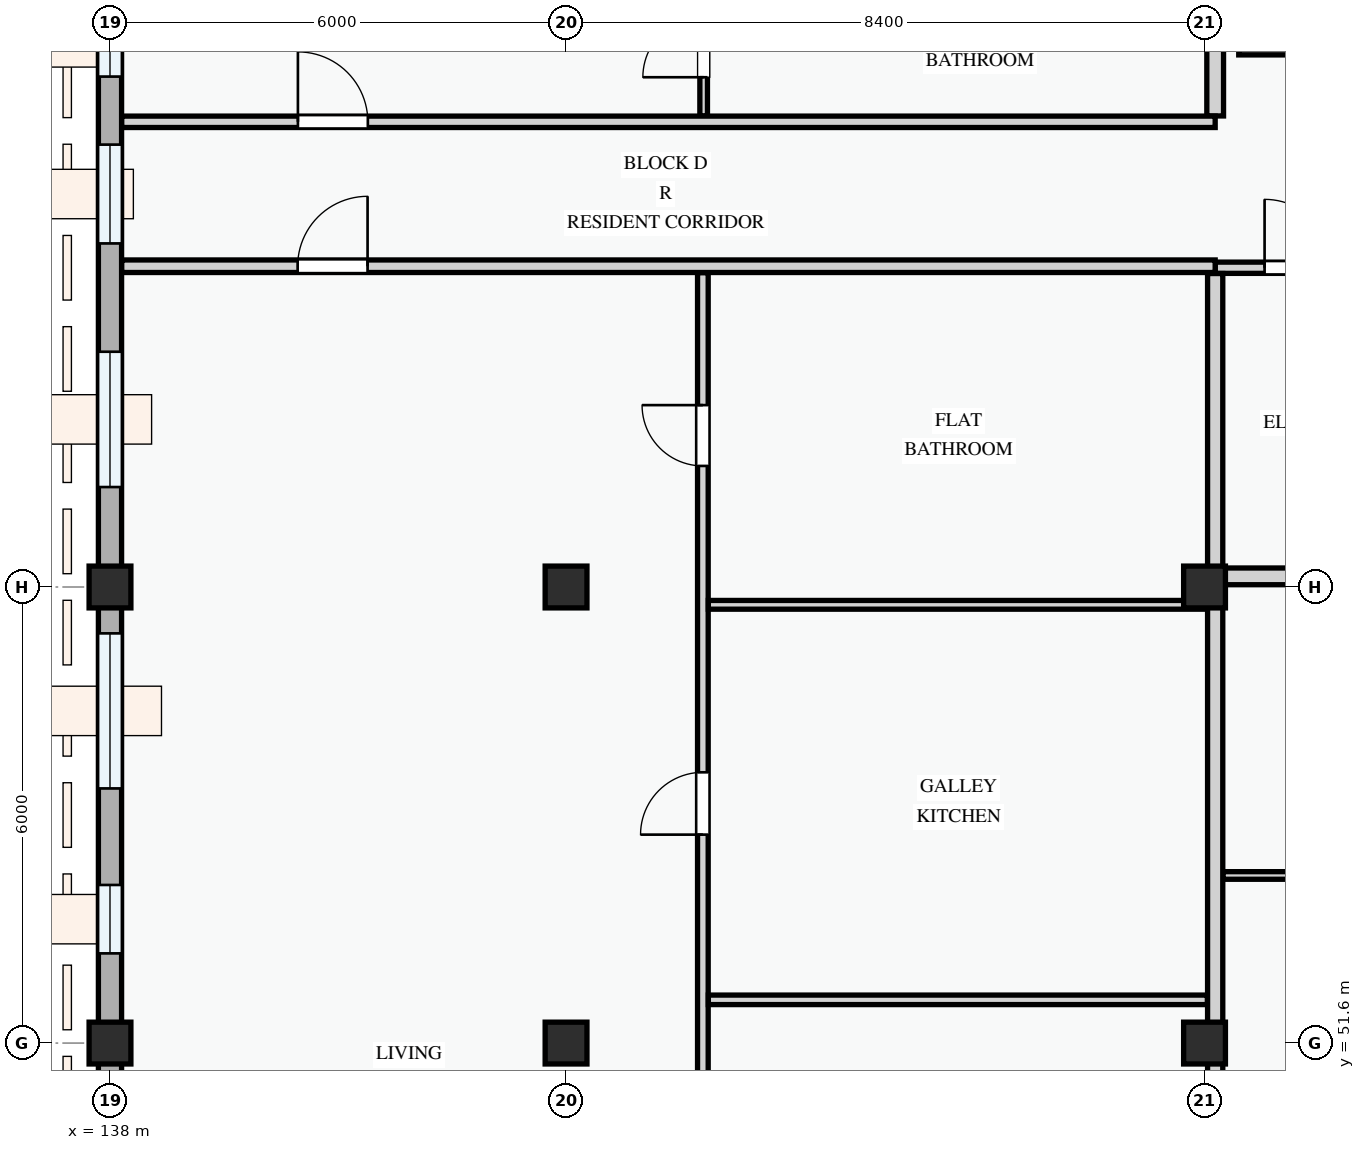
"""IFC4 building model, lengths in metres.
Left out: names, types, materials, properties, quantities, classifications, styles, units other than length and angle.
Written with IfcOpenShell. Run it as: python <this file> out.ifc"""

import sys

from ifc_helpers import new_model, si_unit, direction, frame, frame_2d, origin, origin_2d, place, context, subcontext, project, spatial, rectangle, extrude, element, fill, save


model = new_model("IFC4")
c1 = context("Model", 3, precision=1e-05, world=origin(), true_north=direction((0.0, 1.0)))
c2 = subcontext(c1, "Body", "Model", "MODEL_VIEW")
j1 = project(units=[si_unit("LENGTHUNIT", "METRE"), si_unit("PLANEANGLEUNIT", "RADIAN")], contexts=[c1])
p1 = place(None, origin())
s1 = spatial("IfcSite", under=j1, at=p1, CompositionType="ELEMENT")
p2 = place(p1, origin())
s2 = spatial("IfcBuilding", under=s1, at=p2, CompositionType="ELEMENT")
p3 = place(p2, frame((0.0, 0.0, 14.7)))
s3 = spatial("IfcBuildingStorey", under=s2, at=p3, CompositionType="ELEMENT", Elevation=14.7)
for number, where, z_axis, x_axis in (
    (1, (138.0, 51.6, 0.0), (0.0, 0.0, 1.0), (1.0, 0.0, 0.0)),
    (2, (138.0, 57.6, 0.0), (0.0, 0.0, 1.0), (1.0, 0.0, 0.0)),
    (3, (144.0, 51.6, 0.0), (0.0, 0.0, 1.0), (1.0, 0.0, 0.0)),
    (4, (144.0, 57.6, 0.0), (0.0, 0.0, 1.0), (1.0, 0.0, 0.0)),
    (5, (152.4, 51.6, 0.0), (0.0, 0.0, 1.0), (1.0, 0.0, 0.0)),
    (6, (152.4, 57.6, 0.0), (0.0, 0.0, 1.0), (1.0, 0.0, 0.0)),
):
    element("IfcColumn", number, at=place(p3, frame(where, z_axis=z_axis, x_axis=x_axis)), inside=s3, PredefinedType="COLUMN", context=c2, shape_type="SweptSolid", body=[
        extrude(rectangle(XDim=0.55, YDim=0.55, at=origin_2d()), origin(), (0.0, 0.0, 1.0), 3.3),
    ])
p4 = place(p3, frame((138.0, 66.0, 0.0), z_axis=(0.0, 0.0, 1.0), x_axis=(0.0, -1.0, 0.0)))
e7 = element("IfcWall", 7, at=p4, inside=s3, PredefinedType="STANDARD", context=c2, shape_type="SweptSolid", body=[
    extrude(rectangle(XDim=8.4, YDim=0.305, at=frame_2d((4.2, 0.0))), origin(), (0.0, 0.0, 1.0), 2.425),
])
p5 = place(p4, frame((0.785, 0.0, 0.78)))
e8 = element("IfcOpeningElement", 8, at=p5, cuts=e7, PredefinedType="OPENING", context=c2, shape_type="SweptSolid", body=[
    extrude(rectangle(XDim=0.9, YDim=1.2, at=frame_2d((0.45, 0.6))), frame((0.0, 0.163, 0.0), z_axis=(0.0, -1.0, 0.0), x_axis=(1.0, 0.0, 0.0)), (0.0, 0.0, 1.0), 0.325),
])
p6 = place(p4, frame((2.58, 0.0, 0.78)))
e9 = element("IfcOpeningElement", 9, at=p6, cuts=e7, PredefinedType="OPENING", context=c2, shape_type="SweptSolid", body=[
    extrude(rectangle(XDim=1.3, YDim=1.4, at=frame_2d((0.65, 0.7))), frame((0.0, 0.163, 0.0), z_axis=(0.0, -1.0, 0.0), x_axis=(1.0, 0.0, 0.0)), (0.0, 0.0, 1.0), 0.325),
])
p7 = place(p4, frame((5.305, 0.0, 0.78)))
e10 = element("IfcOpeningElement", 10, at=p7, cuts=e7, PredefinedType="OPENING", context=c2, shape_type="SweptSolid", body=[
    extrude(rectangle(XDim=1.78, YDim=1.42, at=frame_2d((0.89, 0.71))), frame((0.0, 0.163, 0.0), z_axis=(0.0, -1.0, 0.0), x_axis=(1.0, 0.0, 0.0)), (0.0, 0.0, 1.0), 0.325),
])
p8 = place(p3, frame((138.0, 57.6, 0.0), z_axis=(0.0, 0.0, 1.0), x_axis=(0.0, -1.0, 0.0)))
e11 = element("IfcWall", 11, at=p8, inside=s3, PredefinedType="STANDARD", context=c2, shape_type="SweptSolid", body=[
    extrude(rectangle(XDim=6.0, YDim=0.305, at=frame_2d((3.0, 0.0))), origin(), (0.0, 0.0, 1.0), 2.575),
])
p9 = place(p8, frame((0.61, 0.0, 0.78)))
e12 = element("IfcOpeningElement", 12, at=p9, cuts=e11, PredefinedType="OPENING", context=c2, shape_type="SweptSolid", body=[
    extrude(rectangle(XDim=2.04, YDim=1.46, at=frame_2d((1.02, 0.73))), frame((0.0, 0.163, 0.0), z_axis=(0.0, -1.0, 0.0), x_axis=(1.0, 0.0, 0.0)), (0.0, 0.0, 1.0), 0.325),
])
p10 = place(p8, frame((3.92, 0.0, 0.78)))
e13 = element("IfcOpeningElement", 13, at=p10, cuts=e11, PredefinedType="OPENING", context=c2, shape_type="SweptSolid", body=[
    extrude(rectangle(XDim=0.9, YDim=1.2, at=frame_2d((0.45, 0.6))), frame((0.0, 0.163, 0.0), z_axis=(0.0, -1.0, 0.0), x_axis=(1.0, 0.0, 0.0)), (0.0, 0.0, 1.0), 0.325),
])
p11 = place(p3, frame((138.0, 51.6, 0.0), z_axis=(0.0, 0.0, 1.0), x_axis=(0.0, -1.0, 0.0)))
e14 = element("IfcWall", 14, at=p11, inside=s3, PredefinedType="STANDARD", context=c2, shape_type="SweptSolid", body=[
    extrude(rectangle(XDim=8.4, YDim=0.305, at=frame_2d((4.2, 0.0))), origin(), (0.0, 0.0, 1.0), 2.425),
])
p12 = place(p11, frame((1.54, 0.0, 0.78)))
e15 = element("IfcOpeningElement", 15, at=p12, cuts=e14, PredefinedType="OPENING", context=c2, shape_type="SweptSolid", body=[
    extrude(rectangle(XDim=1.38, YDim=1.48, at=frame_2d((0.69, 0.74))), frame((0.0, 0.163, 0.0), z_axis=(0.0, -1.0, 0.0), x_axis=(1.0, 0.0, 0.0)), (0.0, 0.0, 1.0), 0.325),
])
p13 = place(p11, frame((5.31, 0.0, 0.78)))
e16 = element("IfcOpeningElement", 16, at=p13, cuts=e14, PredefinedType="OPENING", context=c2, shape_type="SweptSolid", body=[
    extrude(rectangle(XDim=1.72, YDim=1.52, at=frame_2d((0.86, 0.76))), frame((0.0, 0.163, 0.0), z_axis=(0.0, -1.0, 0.0), x_axis=(1.0, 0.0, 0.0)), (0.0, 0.0, 1.0), 0.325),
])
p14 = place(p3, frame((152.85, 64.725, 0.0), z_axis=(0.0, 0.0, 1.0), x_axis=(1.0, 0.0, 0.0)))
e17 = element("IfcWall", 17, at=p14, inside=s3, PredefinedType="SHEAR", context=c2, shape_type="SweptSolid", body=[
    extrude(rectangle(XDim=13.5, YDim=0.25, at=frame_2d((6.75, 0.0))), origin(), (0.0, 0.0, 1.0), 3.0),
])
p15 = place(p14, frame((6.2, 0.0, 0.0)))
e18 = element("IfcOpeningElement", 18, at=p15, cuts=e17, PredefinedType="OPENING", context=c2, shape_type="SweptSolid", body=[
    extrude(rectangle(XDim=1.1, YDim=2.15, at=frame_2d((0.55, 1.075))), frame((0.0, 0.135, 0.0), z_axis=(0.0, -1.0, 0.0), x_axis=(1.0, 0.0, 0.0)), (0.0, 0.0, 1.0), 0.27),
])
p16 = place(p3, frame((152.54, 61.8, 0.0), z_axis=(0.0, 0.0, 1.0), x_axis=(1.0, 0.0, 0.0)))
e19 = element("IfcWall", 19, at=p16, inside=s3, PredefinedType="PARTITIONING", context=c2, shape_type="SweptSolid", body=[
    extrude(rectangle(XDim=7.435, YDim=0.148, at=frame_2d((3.718, 0.0))), origin(), (0.0, 0.0, 1.0), 3.0),
])
p17 = place(p16, frame((0.65, 0.0, 0.0)))
e20 = element("IfcOpeningElement", 20, at=p17, cuts=e19, PredefinedType="OPENING", context=c2, shape_type="SweptSolid", body=[
    extrude(rectangle(XDim=0.9, YDim=2.1, at=frame_2d((0.45, 1.05))), frame((0.0, 0.084, 0.0), z_axis=(0.0, -1.0, 0.0), x_axis=(1.0, 0.0, 0.0)), (0.0, 0.0, 1.0), 0.168),
])
p18 = place(p16, frame((4.2, 0.0, 0.0)))
e21 = element("IfcOpeningElement", 21, at=p18, cuts=e19, PredefinedType="OPENING", context=c2, shape_type="SweptSolid", body=[
    extrude(rectangle(XDim=0.95, YDim=2.1, at=frame_2d((0.475, 1.05))), frame((0.0, 0.084, 0.0), z_axis=(0.0, -1.0, 0.0), x_axis=(1.0, 0.0, 0.0)), (0.0, 0.0, 1.0), 0.168),
])
p19 = place(p3, frame((152.642, 53.805, 0.0), z_axis=(0.0, 0.0, 1.0), x_axis=(1.0, 0.0, 0.0)))
e22 = element("IfcWall", 22, at=p19, inside=s3, PredefinedType="PARTITIONING", context=c2, shape_type="SweptSolid", body=[
    extrude(rectangle(XDim=7.361, YDim=0.1, at=frame_2d((3.68, 0.0))), origin(), (0.0, 0.0, 1.0), 3.0),
])
p20 = place(p19, frame((1.222, 0.0, 0.0)))
e23 = element("IfcOpeningElement", 23, at=p20, cuts=e22, PredefinedType="OPENING", context=c2, shape_type="SweptSolid", body=[
    extrude(rectangle(XDim=0.82, YDim=2.08, at=frame_2d((0.41, 1.04))), frame((0.0, 0.06, 0.0), z_axis=(0.0, -1.0, 0.0), x_axis=(1.0, 0.0, 0.0)), (0.0, 0.0, 1.0), 0.12),
])
p21 = place(p19, frame((4.117, 0.0, 0.0)))
e24 = element("IfcOpeningElement", 24, at=p21, cuts=e22, PredefinedType="OPENING", context=c2, shape_type="SweptSolid", body=[
    extrude(rectangle(XDim=0.85, YDim=2.1, at=frame_2d((0.425, 1.05))), frame((0.0, 0.06, 0.0), z_axis=(0.0, -1.0, 0.0), x_axis=(1.0, 0.0, 0.0)), (0.0, 0.0, 1.0), 0.12),
])
p22 = place(p19, frame((6.124, 0.0, 0.0)))
e25 = element("IfcOpeningElement", 25, at=p22, cuts=e22, PredefinedType="OPENING", context=c2, shape_type="SweptSolid", body=[
    extrude(rectangle(XDim=0.8, YDim=2.1, at=frame_2d((0.4, 1.05))), frame((0.0, 0.06, 0.0), z_axis=(0.0, -1.0, 0.0), x_axis=(1.0, 0.0, 0.0)), (0.0, 0.0, 1.0), 0.12),
])
p23 = place(p3, frame((152.642, 57.74, 0.0), z_axis=(0.0, 0.0, 1.0), x_axis=(1.0, 0.0, 0.0)))
e26 = element("IfcWall", 26, at=p23, inside=s3, PredefinedType="PARTITIONING", context=c2, shape_type="SweptSolid", body=[
    extrude(rectangle(XDim=7.361, YDim=0.22, at=frame_2d((3.68, 0.0))), origin(), (0.0, 0.0, 1.0), 2.375),
])
p24 = place(p3, frame((145.8, 43.354, 0.0), z_axis=(0.0, 0.0, 1.0), x_axis=(0.0, 1.0, 0.0)))
e27 = element("IfcWall", 27, at=p24, inside=s3, PredefinedType="PARTITIONING", context=c2, shape_type="SweptSolid", body=[
    extrude(rectangle(XDim=18.381, YDim=0.14, at=frame_2d((9.19, 0.0))), origin(), (0.0, 0.0, 1.0), 3.0),
])
p25 = place(p24, frame((3.935, 0.0, 0.0)))
e28 = element("IfcOpeningElement", 28, at=p25, cuts=e27, PredefinedType="OPENING", context=c2, shape_type="SweptSolid", body=[
    extrude(rectangle(XDim=0.85, YDim=2.1, at=frame_2d((0.425, 1.05))), frame((0.0, 0.08, 0.0), z_axis=(0.0, -1.0, 0.0), x_axis=(1.0, 0.0, 0.0)), (0.0, 0.0, 1.0), 0.16),
])
p26 = place(p24, frame((10.988, 0.0, 0.0)))
e29 = element("IfcOpeningElement", 29, at=p26, cuts=e27, PredefinedType="OPENING", context=c2, shape_type="SweptSolid", body=[
    extrude(rectangle(XDim=0.82, YDim=2.08, at=frame_2d((0.41, 1.04))), frame((0.0, 0.08, 0.0), z_axis=(0.0, -1.0, 0.0), x_axis=(1.0, 0.0, 0.0)), (0.0, 0.0, 1.0), 0.16),
])
p27 = place(p24, frame((15.838, 0.0, 0.0)))
e30 = element("IfcOpeningElement", 30, at=p27, cuts=e27, PredefinedType="OPENING", context=c2, shape_type="SweptSolid", body=[
    extrude(rectangle(XDim=0.8, YDim=2.1, at=frame_2d((0.4, 1.05))), frame((0.0, 0.08, 0.0), z_axis=(0.0, -1.0, 0.0), x_axis=(1.0, 0.0, 0.0)), (0.0, 0.0, 1.0), 0.16),
])
p28 = place(p3, frame((145.872, 52.169, 0.0), z_axis=(0.0, 0.0, 1.0), x_axis=(1.0, 0.0, 0.0)))
e31 = element("IfcWall", 31, at=p28, inside=s3, PredefinedType="PARTITIONING", context=c2, shape_type="SweptSolid", body=[
    extrude(rectangle(XDim=6.566, YDim=0.125, at=frame_2d((3.283, 0.0))), origin(), (0.0, 0.0, 1.0), 3.0),
])
p29 = place(p3, frame((145.872, 57.365, 0.0), z_axis=(0.0, 0.0, 1.0), x_axis=(1.0, 0.0, 0.0)))
e32 = element("IfcWall", 32, at=p29, inside=s3, PredefinedType="PARTITIONING", context=c2, shape_type="SweptSolid", body=[
    extrude(rectangle(XDim=6.566, YDim=0.115, at=frame_2d((3.283, 0.0))), origin(), (0.0, 0.0, 1.0), 2.375),
])
p30 = place(p3, frame((145.81, 63.797, 0.0), z_axis=(0.0, 0.0, 1.0), x_axis=(0.0, 1.0, 0.0)))
e33 = element("IfcWall", 33, at=p30, inside=s3, PredefinedType="PARTITIONING", context=c2, shape_type="SweptSolid", body=[
    extrude(rectangle(XDim=8.048, YDim=0.1, at=frame_2d((4.024, 0.0))), origin(), (0.0, 0.0, 1.0), 3.0),
])
p31 = place(p30, frame((0.51, 0.0, 0.0)))
e34 = element("IfcOpeningElement", 34, at=p31, cuts=e33, PredefinedType="OPENING", context=c2, shape_type="SweptSolid", body=[
    extrude(rectangle(XDim=0.8, YDim=2.1, at=frame_2d((0.4, 1.05))), frame((0.0, 0.06, 0.0), z_axis=(0.0, -1.0, 0.0), x_axis=(1.0, 0.0, 0.0)), (0.0, 0.0, 1.0), 0.12),
])
p32 = place(p30, frame((2.622, 0.0, 0.0)))
e35 = element("IfcOpeningElement", 35, at=p32, cuts=e33, PredefinedType="OPENING", context=c2, shape_type="SweptSolid", body=[
    extrude(rectangle(XDim=0.85, YDim=2.1, at=frame_2d((0.425, 1.05))), frame((0.0, 0.06, 0.0), z_axis=(0.0, -1.0, 0.0), x_axis=(1.0, 0.0, 0.0)), (0.0, 0.0, 1.0), 0.12),
])
p33 = place(p30, frame((5.745, 0.0, 0.0)))
e36 = element("IfcOpeningElement", 36, at=p33, cuts=e33, PredefinedType="OPENING", context=c2, shape_type="SweptSolid", body=[
    extrude(rectangle(XDim=0.82, YDim=2.08, at=frame_2d((0.41, 1.04))), frame((0.0, 0.06, 0.0), z_axis=(0.0, -1.0, 0.0), x_axis=(1.0, 0.0, 0.0)), (0.0, 0.0, 1.0), 0.12),
])
p34 = place(p3, frame((152.54, 43.26, 0.0), z_axis=(0.0, 0.0, 1.0), x_axis=(0.0, 1.0, 0.0)))
e37 = element("IfcWall", 37, at=p34, inside=s3, PredefinedType="PARTITIONING", context=c2, shape_type="SweptSolid", body=[
    extrude(rectangle(XDim=18.464, YDim=0.2, at=frame_2d((9.232, 0.0))), origin(), (0.0, 0.0, 1.0), 2.425),
])
p35 = place(p3, frame((152.54, 63.797, 0.0), z_axis=(0.0, 0.0, 1.0), x_axis=(0.0, 1.0, 0.0)))
e38 = element("IfcWall", 38, at=p35, inside=s3, PredefinedType="PARTITIONING", context=c2, shape_type="SweptSolid", body=[
    extrude(rectangle(XDim=8.048, YDim=0.22, at=frame_2d((4.024, 0.0))), origin(), (0.0, 0.0, 1.0), 2.425),
])
p36 = place(p3, frame((138.155, 61.82, 0.0), z_axis=(0.0, 0.0, 1.0), x_axis=(1.0, 0.0, 0.0)))
e39 = element("IfcWall", 39, at=p36, inside=s3, PredefinedType="PARTITIONING", context=c2, shape_type="SweptSolid", body=[
    extrude(rectangle(XDim=14.385, YDim=0.165, at=frame_2d((7.193, 0.0))), origin(), (0.0, 0.0, 1.0), 3.0),
])
p37 = place(p36, frame((2.314, 0.0, 0.0)))
e40 = element("IfcOpeningElement", 40, at=p37, cuts=e39, PredefinedType="OPENING", context=c2, shape_type="SweptSolid", body=[
    extrude(rectangle(XDim=0.92, YDim=2.1, at=frame_2d((0.46, 1.05))), frame((0.0, 0.093, 0.0), z_axis=(0.0, -1.0, 0.0), x_axis=(1.0, 0.0, 0.0)), (0.0, 0.0, 1.0), 0.185),
])
p38 = place(p3, frame((138.155, 63.72, 0.0), z_axis=(0.0, 0.0, 1.0), x_axis=(1.0, 0.0, 0.0)))
e41 = element("IfcWall", 41, at=p38, inside=s3, PredefinedType="PARTITIONING", context=c2, shape_type="SweptSolid", body=[
    extrude(rectangle(XDim=14.385, YDim=0.15, at=frame_2d((7.193, 0.0))), origin(), (0.0, 0.0, 1.0), 3.0),
])
p39 = place(p38, frame((2.318, 0.0, 0.0)))
e42 = element("IfcOpeningElement", 42, at=p39, cuts=e41, PredefinedType="OPENING", context=c2, shape_type="SweptSolid", body=[
    extrude(rectangle(XDim=0.92, YDim=2.1, at=frame_2d((0.46, 1.05))), frame((0.0, 0.085, 0.0), z_axis=(0.0, -1.0, 0.0), x_axis=(1.0, 0.0, 0.0)), (0.0, 0.0, 1.0), 0.17),
])
p40 = place(p5, origin())
e43 = element("IfcWindow", 43, at=p40, inside=s3, PartitioningType="SINGLE_PANEL", PredefinedType="WINDOW", context=c2, shape_type="SweptSolid", body=[
    extrude(rectangle(XDim=0.9, YDim=1.2, at=frame_2d((0.45, 0.6))), frame((0.0, 0.03, 0.0), z_axis=(0.0, -1.0, 0.0), x_axis=(1.0, 0.0, 0.0)), (0.0, 0.0, 1.0), 0.06),
])
fill(e8, e43)
p41 = place(p6, origin())
e44 = element("IfcWindow", 44, at=p41, inside=s3, PartitioningType="SINGLE_PANEL", PredefinedType="WINDOW", context=c2, shape_type="SweptSolid", body=[
    extrude(rectangle(XDim=1.3, YDim=1.4, at=frame_2d((0.65, 0.7))), frame((0.0, 0.03, 0.0), z_axis=(0.0, -1.0, 0.0), x_axis=(1.0, 0.0, 0.0)), (0.0, 0.0, 1.0), 0.06),
])
fill(e9, e44)
p42 = place(p7, origin())
e45 = element("IfcWindow", 45, at=p42, inside=s3, PartitioningType="DOUBLE_PANEL_VERTICAL", PredefinedType="WINDOW", context=c2, shape_type="SweptSolid", body=[
    extrude(rectangle(XDim=1.78, YDim=1.42, at=frame_2d((0.89, 0.71))), frame((0.0, 0.03, 0.0), z_axis=(0.0, -1.0, 0.0), x_axis=(1.0, 0.0, 0.0)), (0.0, 0.0, 1.0), 0.06),
])
fill(e10, e45)
p43 = place(p9, origin())
e46 = element("IfcWindow", 46, at=p43, inside=s3, PartitioningType="DOUBLE_PANEL_VERTICAL", PredefinedType="WINDOW", context=c2, shape_type="SweptSolid", body=[
    extrude(rectangle(XDim=2.04, YDim=1.46, at=frame_2d((1.02, 0.73))), frame((0.0, 0.03, 0.0), z_axis=(0.0, -1.0, 0.0), x_axis=(1.0, 0.0, 0.0)), (0.0, 0.0, 1.0), 0.06),
])
fill(e12, e46)
p44 = place(p10, origin())
e47 = element("IfcWindow", 47, at=p44, inside=s3, PartitioningType="SINGLE_PANEL", PredefinedType="WINDOW", context=c2, shape_type="SweptSolid", body=[
    extrude(rectangle(XDim=0.9, YDim=1.2, at=frame_2d((0.45, 0.6))), frame((0.0, 0.03, 0.0), z_axis=(0.0, -1.0, 0.0), x_axis=(1.0, 0.0, 0.0)), (0.0, 0.0, 1.0), 0.06),
])
fill(e13, e47)
p45 = place(p17, origin())
e48 = element("IfcDoor", 48, at=p45, inside=s3, OperationType="SINGLE_SWING_LEFT", PredefinedType="DOOR", context=c2, shape_type="SweptSolid", body=[
    extrude(rectangle(XDim=0.9, YDim=2.1, at=frame_2d((0.45, 1.05))), frame((0.0, 0.025, 0.0), z_axis=(0.0, -1.0, 0.0), x_axis=(1.0, 0.0, 0.0)), (0.0, 0.0, 1.0), 0.05),
])
fill(e20, e48)
p46 = place(p26, origin())
e49 = element("IfcDoor", 49, at=p46, inside=s3, OperationType="SINGLE_SWING_LEFT", PredefinedType="DOOR", context=c2, shape_type="SweptSolid", body=[
    extrude(rectangle(XDim=0.82, YDim=2.08, at=frame_2d((0.41, 1.04))), frame((0.0, 0.025, 0.0), z_axis=(0.0, -1.0, 0.0), x_axis=(1.0, 0.0, 0.0)), (0.0, 0.0, 1.0), 0.05),
])
fill(e29, e49)
p47 = place(p27, origin())
e50 = element("IfcDoor", 50, at=p47, inside=s3, OperationType="SINGLE_SWING_RIGHT", PredefinedType="DOOR", context=c2, shape_type="SweptSolid", body=[
    extrude(rectangle(XDim=0.8, YDim=2.1, at=frame_2d((0.4, 1.05))), frame((0.0, 0.025, 0.0), z_axis=(0.0, -1.0, 0.0), x_axis=(1.0, 0.0, 0.0)), (0.0, 0.0, 1.0), 0.05),
])
fill(e30, e50)
p48 = place(p31, origin())
e51 = element("IfcDoor", 51, at=p48, inside=s3, OperationType="SINGLE_SWING_LEFT", PredefinedType="DOOR", context=c2, shape_type="SweptSolid", body=[
    extrude(rectangle(XDim=0.8, YDim=2.1, at=frame_2d((0.4, 1.05))), frame((0.0, 0.025, 0.0), z_axis=(0.0, -1.0, 0.0), x_axis=(1.0, 0.0, 0.0)), (0.0, 0.0, 1.0), 0.05),
])
fill(e34, e51)
p49 = place(p37, origin())
e52 = element("IfcDoor", 52, at=p49, inside=s3, OperationType="SINGLE_SWING_RIGHT", PredefinedType="DOOR", context=c2, shape_type="SweptSolid", body=[
    extrude(rectangle(XDim=0.92, YDim=2.1, at=frame_2d((0.46, 1.05))), frame((0.0, 0.025, 0.0), z_axis=(0.0, -1.0, 0.0), x_axis=(1.0, 0.0, 0.0)), (0.0, 0.0, 1.0), 0.05),
])
fill(e40, e52)
p50 = place(p39, origin())
e53 = element("IfcDoor", 53, at=p50, inside=s3, OperationType="SINGLE_SWING_LEFT", PredefinedType="DOOR", context=c2, shape_type="SweptSolid", body=[
    extrude(rectangle(XDim=0.92, YDim=2.1, at=frame_2d((0.46, 1.05))), frame((0.0, 0.025, 0.0), z_axis=(0.0, -1.0, 0.0), x_axis=(1.0, 0.0, 0.0)), (0.0, 0.0, 1.0), 0.05),
])
fill(e42, e53)
save(model, sys.argv[1])
